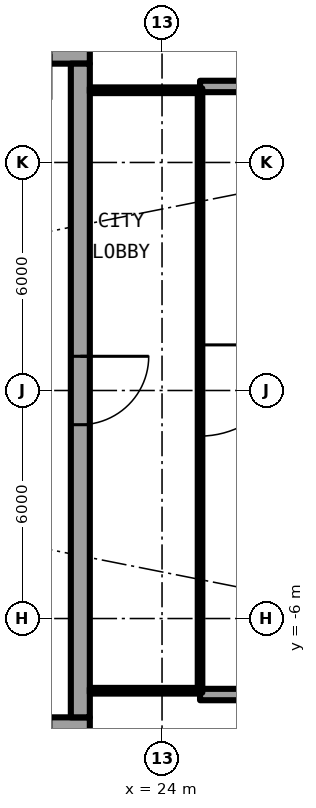
"""IFC4 building model, lengths in metres.
Left out: names, types, materials, properties, quantities, classifications, styles, units other than length and angle.
Written with IfcOpenShell. Run it as: python <this file> out.ifc"""

import sys

from ifc_helpers import new_model, si_unit, direction, frame, frame_2d, origin, place, context, subcontext, project, spatial, rectangle, extrude, element, fill, save


model = new_model("IFC4")
c1 = context("Model", 3, precision=1e-05, world=origin(), true_north=direction((0.0, 1.0)))
c2 = subcontext(c1, "Body", "Model", "MODEL_VIEW")
j1 = project(units=[si_unit("LENGTHUNIT", "METRE"), si_unit("PLANEANGLEUNIT", "RADIAN")], contexts=[c1])
p1 = place(None, origin())
s1 = spatial("IfcSite", under=j1, at=p1, CompositionType="ELEMENT")
p2 = place(p1, origin())
s2 = spatial("IfcBuilding", under=s1, at=p2, CompositionType="ELEMENT")
p3 = place(p2, frame((0.0, 0.0, 145.2)))
s3 = spatial("IfcBuildingStorey", under=s2, at=p3, CompositionType="ELEMENT", Elevation=145.2)
for number, where, z_axis, x_axis in (
    (1, (25.0, 8.0, 0.0), (0.0, 0.0, 1.0), (1.0, 0.0, 0.0)),
    (2, (25.0, -8.0, 0.0), (0.0, 0.0, 1.0), (1.0, 0.0, 0.0)),
):
    element("IfcWall", number, at=place(p3, frame(where, z_axis=z_axis, x_axis=x_axis)), inside=s3, PredefinedType="SOLIDWALL", context=c2, shape_type="SweptSolid", body=[
        extrude(rectangle(XDim=2.667, YDim=0.3, at=frame_2d((1.333, 0.0))), origin(), (0.0, 0.0, 1.0), 2.7),
    ])
p4 = place(p3, frame((22.1, 8.85, 0.0), z_axis=(0.0, 0.0, 1.0), x_axis=(-1.0, 0.0, 0.0)))
e3 = element("IfcWall", 3, at=p4, inside=s3, PredefinedType="SHEAR", context=c2, shape_type="SweptSolid", body=[
    extrude(rectangle(XDim=13.6, YDim=0.5, at=frame_2d((6.8, 0.0))), origin(), (0.0, 0.0, 1.0), 3.05),
])
p5 = place(p4, frame((1.025, 0.0, 0.0)))
e4 = element("IfcOpeningElement", 4, at=p5, cuts=e3, PredefinedType="OPENING", context=c2, shape_type="SweptSolid", body=[
    extrude(rectangle(XDim=1.2, YDim=2.3, at=frame_2d((0.6, 1.15))), frame((0.0, 0.26, 0.0), z_axis=(0.0, -1.0, 0.0), x_axis=(1.0, 0.0, 0.0)), (0.0, 0.0, 1.0), 0.52),
])
p6 = place(p3, frame((8.5, -8.85, 0.0), z_axis=(0.0, 0.0, 1.0), x_axis=(1.0, 0.0, 0.0)))
e5 = element("IfcWall", 5, at=p6, inside=s3, PredefinedType="SHEAR", context=c2, shape_type="SweptSolid", body=[
    extrude(rectangle(XDim=13.6, YDim=0.5, at=frame_2d((6.8, 0.0))), origin(), (0.0, 0.0, 1.0), 3.05),
])
p7 = place(p6, frame((11.375, 0.0, 0.0)))
e6 = element("IfcOpeningElement", 6, at=p7, cuts=e5, PredefinedType="OPENING", context=c2, shape_type="SweptSolid", body=[
    extrude(rectangle(XDim=1.2, YDim=2.3, at=frame_2d((0.6, 1.15))), frame((0.0, 0.26, 0.0), z_axis=(0.0, -1.0, 0.0), x_axis=(1.0, 0.0, 0.0)), (0.0, 0.0, 1.0), 0.52),
])
p8 = place(p3, frame((21.85, 8.6, 0.0), z_axis=(0.0, 0.0, 1.0), x_axis=(0.0, -1.0, 0.0)))
e7 = element("IfcWall", 7, at=p8, inside=s3, PredefinedType="SHEAR", context=c2, shape_type="SweptSolid", body=[
    extrude(rectangle(XDim=17.2, YDim=0.5, at=frame_2d((8.6, 0.0))), origin(), (0.0, 0.0, 1.0), 3.05),
])
p9 = place(p8, frame((7.7, 0.0, 0.0)))
e8 = element("IfcOpeningElement", 8, at=p9, cuts=e7, PredefinedType="OPENING", context=c2, shape_type="SweptSolid", body=[
    extrude(rectangle(XDim=1.8, YDim=2.3, at=frame_2d((0.9, 1.15))), frame((0.0, 0.26, 0.0), z_axis=(0.0, -1.0, 0.0), x_axis=(1.0, 0.0, 0.0)), (0.0, 0.0, 1.0), 0.52),
])
for number, where, z_axis, x_axis in (
    (9, (22.1, -7.9, 0.0), (0.0, 0.0, 1.0), (1.0, 0.0, 0.0)),
    (10, (22.1, 7.9, 0.0), (0.0, 0.0, 1.0), (1.0, 0.0, 0.0)),
):
    element("IfcWall", number, at=place(p3, frame(where, z_axis=z_axis, x_axis=x_axis)), inside=s3, PredefinedType="PARTITIONING", context=c2, shape_type="SweptSolid", body=[
        extrude(rectangle(XDim=2.84, YDim=0.15, at=frame_2d((1.42, 0.0))), origin(), (0.0, 0.0, 1.0), 2.7),
    ])
p10 = place(p3, frame((25.0, 7.95, 0.0), z_axis=(0.0, 0.0, 1.0), x_axis=(0.0, -1.0, 0.0)))
e11 = element("IfcWall", 11, at=p10, inside=s3, PredefinedType="PARTITIONING", context=c2, shape_type="SweptSolid", body=[
    extrude(rectangle(XDim=15.9, YDim=0.12, at=frame_2d((7.95, 0.0))), origin(), (0.0, 0.0, 1.0), 2.7),
])
p11 = place(p10, frame((6.75, 0.0, 0.0)))
e12 = element("IfcOpeningElement", 12, at=p11, cuts=e11, PredefinedType="OPENING", context=c2, shape_type="SweptSolid", body=[
    extrude(rectangle(XDim=2.4, YDim=2.3, at=frame_2d((1.2, 1.15))), frame((0.0, 0.07, 0.0), z_axis=(0.0, -1.0, 0.0), x_axis=(1.0, 0.0, 0.0)), (0.0, 0.0, 1.0), 0.14),
])
p12 = place(p10, frame((11.55, 0.0, 0.1)))
e13 = element("IfcOpeningElement", 13, at=p12, cuts=e11, PredefinedType="OPENING", context=c2, shape_type="SweptSolid", body=[
    extrude(rectangle(XDim=3.4, YDim=2.35, at=frame_2d((1.7, 1.175))), frame((0.0, 0.07, 0.0), z_axis=(0.0, -1.0, 0.0), x_axis=(1.0, 0.0, 0.0)), (0.0, 0.0, 1.0), 0.14),
])
p13 = place(p10, frame((0.95, 0.0, 0.1)))
e14 = element("IfcOpeningElement", 14, at=p13, cuts=e11, PredefinedType="OPENING", context=c2, shape_type="SweptSolid", body=[
    extrude(rectangle(XDim=3.4, YDim=2.35, at=frame_2d((1.7, 1.175))), frame((0.0, 0.07, 0.0), z_axis=(0.0, -1.0, 0.0), x_axis=(1.0, 0.0, 0.0)), (0.0, 0.0, 1.0), 0.14),
])
p14 = place(p9, origin())
e15 = element("IfcDoor", 15, at=p14, inside=s3, OperationType="SINGLE_SWING_LEFT", PredefinedType="DOOR", context=c2, shape_type="SweptSolid", body=[
    extrude(rectangle(XDim=1.8, YDim=2.3, at=frame_2d((0.9, 1.15))), frame((0.0, 0.025, 0.0), z_axis=(0.0, -1.0, 0.0), x_axis=(1.0, 0.0, 0.0)), (0.0, 0.0, 1.0), 0.05),
])
fill(e8, e15)
p15 = place(p11, origin())
e16 = element("IfcDoor", 16, at=p15, inside=s3, OperationType="SINGLE_SWING_LEFT", PredefinedType="DOOR", context=c2, shape_type="SweptSolid", body=[
    extrude(rectangle(XDim=2.4, YDim=2.3, at=frame_2d((1.2, 1.15))), frame((0.0, 0.025, 0.0), z_axis=(0.0, -1.0, 0.0), x_axis=(1.0, 0.0, 0.0)), (0.0, 0.0, 1.0), 0.05),
])
fill(e12, e16)
p16 = place(p12, origin())
e17 = element("IfcWindow", 17, at=p16, inside=s3, PartitioningType="SINGLE_PANEL", PredefinedType="WINDOW", context=c2, shape_type="SweptSolid", body=[
    extrude(rectangle(XDim=3.4, YDim=2.35, at=frame_2d((1.7, 1.175))), frame((0.0, 0.03, 0.0), z_axis=(0.0, -1.0, 0.0), x_axis=(1.0, 0.0, 0.0)), (0.0, 0.0, 1.0), 0.06),
])
fill(e13, e17)
p17 = place(p13, origin())
e18 = element("IfcWindow", 18, at=p17, inside=s3, PartitioningType="SINGLE_PANEL", PredefinedType="WINDOW", context=c2, shape_type="SweptSolid", body=[
    extrude(rectangle(XDim=3.4, YDim=2.35, at=frame_2d((1.7, 1.175))), frame((0.0, 0.03, 0.0), z_axis=(0.0, -1.0, 0.0), x_axis=(1.0, 0.0, 0.0)), (0.0, 0.0, 1.0), 0.06),
])
fill(e14, e18)
save(model, sys.argv[1])
